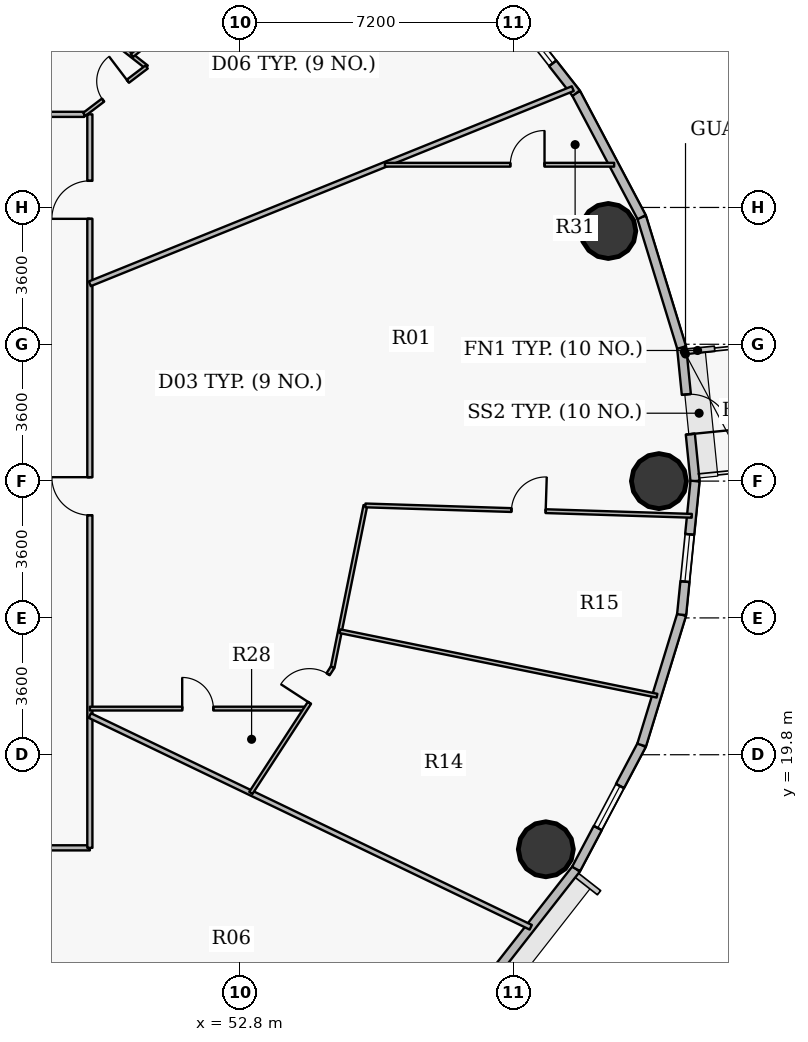
"""IFC4 building model, lengths in metres.
Left out: names, types, materials, properties, quantities, classifications, styles, units other than length and angle.
Written with IfcOpenShell. Run it as: python <this file> out.ifc"""

import sys

from ifc_helpers import new_model, si_unit, direction, frame, frame_2d, origin, origin_2d, place, context, subcontext, project, spatial, rectangle, hollow_circle, extrude, source, transform, mapped, element, fill, save


model = new_model("IFC4")
c1 = context("Model", 3, precision=1e-05, world=origin(), true_north=direction((0.0, 1.0)))
c2 = subcontext(c1, "Body", "Model", "MODEL_VIEW")
j1 = project(units=[si_unit("LENGTHUNIT", "METRE"), si_unit("PLANEANGLEUNIT", "RADIAN")], contexts=[c1])
p1 = place(None, origin())
s1 = spatial("IfcSite", under=j1, at=p1, CompositionType="ELEMENT")
p2 = place(p1, origin())
s2 = spatial("IfcBuilding", under=s1, at=p2, CompositionType="ELEMENT")
p3 = place(p2, frame((0.0, 0.0, 104.7)))
s3 = spatial("IfcBuildingStorey", under=s2, at=p3, CompositionType="ELEMENT", Elevation=104.7)
for number, where, z_axis, x_axis in (
    (1, (63.825, 27.0, 0.0), (0.0, 0.0, 1.0), (1.0, 0.0, 0.0)),
    (2, (62.493, 33.581, 0.0), (0.0, 0.0, 1.0), (1.0, 0.0, 0.0)),
    (3, (60.849, 17.312, 0.0), (0.0, 0.0, 1.0), (1.0, 0.0, 0.0)),
):
    element("IfcColumn", number, at=place(p3, frame(where, z_axis=z_axis, x_axis=x_axis)), inside=s3, PredefinedType="COLUMN", context=c2, shape_type="SweptSolid", body=[
        extrude(hollow_circle(Radius=0.725, WallThickness=0.042, at=origin_2d()), origin(), (0.0, 0.0, 1.0), 3.75),
    ])
p4 = place(p3, frame((64.422, 30.515, 0.0), z_axis=(0.0, 0.0, 1.0), x_axis=(0.099989468229, -0.994988495533, 0.0)))
e4 = element("IfcWall", 4, at=p4, inside=s3, PredefinedType="SOLIDWALL", context=c2, shape_type="SweptSolid", body=[
    extrude(rectangle(XDim=3.533, YDim=0.24, at=frame_2d((1.767, 0.0))), origin(), (0.0, 0.0, 1.0), 3.5),
])
p5 = place(p4, frame((1.241, 0.0, 0.0)))
e5 = element("IfcOpeningElement", 5, at=p5, cuts=e4, PredefinedType="OPENING", context=c2, shape_type="SweptSolid", body=[
    extrude(rectangle(XDim=1.05, YDim=2.15, at=origin_2d()), frame((0.525, 0.13, 1.075), z_axis=(0.0, -1.0, 0.0), x_axis=(1.0, 0.0, 0.0)), (0.0, 0.0, 1.0), 0.26),
])
p6 = place(p3, frame((63.37, 33.945, 0.0), z_axis=(0.0, 0.0, 1.0), x_axis=(0.293124431344, -0.956074300329, 0.0)))
e6 = element("IfcWall", 6, at=p6, inside=s3, PredefinedType="SOLIDWALL", context=c2, shape_type="SweptSolid", body=[
    extrude(rectangle(XDim=3.587, YDim=0.24, at=frame_2d((1.793, 0.0))), origin(), (0.0, 0.0, 1.0), 3.5),
])
p7 = place(p3, frame((61.645, 37.206, 0.0), z_axis=(0.0, 0.0, 1.0), x_axis=(0.467614004126, -0.883932770716, 0.0)))
e7 = element("IfcWall", 7, at=p7, inside=s3, PredefinedType="SOLIDWALL", context=c2, shape_type="SweptSolid", body=[
    extrude(rectangle(XDim=3.689, YDim=0.24, at=frame_2d((1.844, 0.0))), origin(), (0.0, 0.0, 1.0), 3.5),
])
p8 = place(p3, frame((59.289, 40.217, 0.0), z_axis=(0.0, 0.0, 1.0), x_axis=(0.616272103517, -0.787533297345, 0.0)))
e8 = element("IfcWall", 8, at=p8, inside=s3, PredefinedType="SOLIDWALL", context=c2, shape_type="SweptSolid", body=[
    extrude(rectangle(XDim=3.823, YDim=0.24, at=frame_2d((1.912, 0.0))), origin(), (0.0, 0.0, 1.0), 3.5),
])
p9 = place(p8, frame((0.824, 0.0, 0.9)))
e9 = element("IfcOpeningElement", 9, at=p9, cuts=e8, PredefinedType="OPENING", context=c2, shape_type="SweptSolid", body=[
    extrude(rectangle(XDim=2.0, YDim=1.75, at=origin_2d()), frame((1.0, 0.13, 0.875), z_axis=(0.0, -1.0, 0.0), x_axis=(1.0, 0.0, 0.0)), (0.0, 0.0, 1.0), 0.26),
])
p10 = place(p3, frame((61.645, 16.794, 0.0), z_axis=(0.0, 0.0, 1.0), x_axis=(-0.616272103517, -0.787533297345, 0.0)))
e10 = element("IfcWall", 10, at=p10, inside=s3, PredefinedType="SOLIDWALL", context=c2, shape_type="SweptSolid", body=[
    extrude(rectangle(XDim=3.823, YDim=0.24, at=frame_2d((1.912, 0.0))), origin(), (0.0, 0.0, 1.0), 3.5),
])
p11 = place(p3, frame((63.37, 20.055, 0.0), z_axis=(0.0, 0.0, 1.0), x_axis=(-0.467614004126, -0.883932770716, 0.0)))
e11 = element("IfcWall", 11, at=p11, inside=s3, PredefinedType="SOLIDWALL", context=c2, shape_type="SweptSolid", body=[
    extrude(rectangle(XDim=3.689, YDim=0.24, at=frame_2d((1.844, 0.0))), origin(), (0.0, 0.0, 1.0), 3.5),
])
p12 = place(p11, frame((1.219, 0.0, 0.9)))
e12 = element("IfcOpeningElement", 12, at=p12, cuts=e11, PredefinedType="OPENING", context=c2, shape_type="SweptSolid", body=[
    extrude(rectangle(XDim=1.25, YDim=1.65, at=origin_2d()), frame((0.625, 0.13, 0.825), z_axis=(0.0, -1.0, 0.0), x_axis=(1.0, 0.0, 0.0)), (0.0, 0.0, 1.0), 0.26),
])
p13 = place(p3, frame((64.422, 23.485, 0.0), z_axis=(0.0, 0.0, 1.0), x_axis=(-0.293124431344, -0.956074300329, 0.0)))
e13 = element("IfcWall", 13, at=p13, inside=s3, PredefinedType="SOLIDWALL", context=c2, shape_type="SweptSolid", body=[
    extrude(rectangle(XDim=3.587, YDim=0.24, at=frame_2d((1.793, 0.0))), origin(), (0.0, 0.0, 1.0), 3.5),
])
p14 = place(p3, frame((64.775, 27.0, 0.0), z_axis=(0.0, 0.0, 1.0), x_axis=(-0.099989468229, -0.994988495533, 0.0)))
e14 = element("IfcWall", 14, at=p14, inside=s3, PredefinedType="SOLIDWALL", context=c2, shape_type="SweptSolid", body=[
    extrude(rectangle(XDim=3.533, YDim=0.24, at=frame_2d((1.767, 0.0))), origin(), (0.0, 0.0, 1.0), 3.5),
])
p15 = place(p14, frame((1.408, 0.0, 0.9)))
e15 = element("IfcOpeningElement", 15, at=p15, cuts=e14, PredefinedType="OPENING", context=c2, shape_type="SweptSolid", body=[
    extrude(rectangle(XDim=1.25, YDim=1.65, at=origin_2d()), frame((0.625, 0.13, 0.825), z_axis=(0.0, -1.0, 0.0), x_axis=(1.0, 0.0, 0.0)), (0.0, 0.0, 1.0), 0.26),
])
p16 = place(p3, frame((34.795, 17.35, 0.0), z_axis=(0.0, 0.0, 1.0), x_axis=(1.0, 0.0, 0.0)))
e16 = element("IfcWall", 16, at=p16, inside=s3, PredefinedType="PARTITIONING", context=c2, shape_type="SweptSolid", body=[
    extrude(rectangle(XDim=14.055, YDim=0.135, at=frame_2d((7.028, 0.0))), origin(), (0.0, 0.0, 1.0), 2.935),
])
p17 = place(p16, frame((1.571, 0.0, 0.0)))
e17 = element("IfcOpeningElement", 17, at=p17, cuts=e16, PredefinedType="OPENING", context=c2, shape_type="SweptSolid", body=[
    extrude(rectangle(XDim=1.0, YDim=2.15, at=origin_2d()), frame((0.5, 0.078, 1.075), z_axis=(0.0, -1.0, 0.0), x_axis=(1.0, 0.0, 0.0)), (0.0, 0.0, 1.0), 0.155),
])
p18 = place(p16, frame((10.976, 0.0, 0.0)))
e18 = element("IfcOpeningElement", 18, at=p18, cuts=e16, PredefinedType="OPENING", context=c2, shape_type="SweptSolid", body=[
    extrude(rectangle(XDim=1.0, YDim=2.15, at=origin_2d()), frame((0.5, 0.078, 1.075), z_axis=(0.0, -1.0, 0.0), x_axis=(1.0, 0.0, 0.0)), (0.0, 0.0, 1.0), 0.155),
])
p19 = place(p3, frame((37.205, 36.65, 0.0), z_axis=(0.0, 0.0, 1.0), x_axis=(1.0, 0.0, 0.0)))
e19 = element("IfcWall", 19, at=p19, inside=s3, PredefinedType="PARTITIONING", context=c2, shape_type="SweptSolid", body=[
    extrude(rectangle(XDim=11.499, YDim=0.135, at=frame_2d((5.75, 0.0))), origin(), (0.0, 0.0, 1.0), 2.935),
])
p20 = place(p19, frame((3.988, 0.0, 0.0)))
e20 = element("IfcOpeningElement", 20, at=p20, cuts=e19, PredefinedType="OPENING", context=c2, shape_type="SweptSolid", body=[
    extrude(rectangle(XDim=1.0, YDim=2.15, at=origin_2d()), frame((0.5, 0.078, 1.075), z_axis=(0.0, -1.0, 0.0), x_axis=(1.0, 0.0, 0.0)), (0.0, 0.0, 1.0), 0.155),
])
p21 = place(p3, frame((43.42, 36.65, 0.0), z_axis=(0.0, 0.0, 1.0), x_axis=(0.609572126114, 0.792730611913, 0.0)))
e21 = element("IfcWall", 21, at=p21, inside=s3, PredefinedType="PARTITIONING", context=c2, shape_type="SweptSolid", body=[
    extrude(rectangle(XDim=12.086, YDim=0.135, at=frame_2d((6.043, 0.0))), origin(), (0.0, 0.0, 1.0), 2.935),
])
p22 = place(p3, frame((47.891, 39.816, 0.0), z_axis=(0.0, 0.0, 1.0), x_axis=(0.787339621997, -0.616519520887, 0.0)))
e22 = element("IfcWall", 22, at=p22, inside=s3, PredefinedType="PARTITIONING", context=c2, shape_type="SweptSolid", body=[
    extrude(rectangle(XDim=3.116, YDim=0.1, at=frame_2d((1.558, 0.0))), origin(), (0.0, 0.0, 1.0), 2.935),
])
p23 = place(p3, frame((48.704, 36.65, 0.0), z_axis=(0.0, 0.0, 1.0), x_axis=(0.796299280247, 0.604902848628, 0.0)))
e23 = element("IfcWall", 23, at=p23, inside=s3, PredefinedType="PARTITIONING", context=c2, shape_type="SweptSolid", body=[
    extrude(rectangle(XDim=2.059, YDim=0.1, at=frame_2d((1.029, 0.0))), origin(), (0.0, 0.0, 1.0), 2.935),
])
p24 = place(p23, frame((0.619, 0.0, 0.0)))
e24 = element("IfcOpeningElement", 24, at=p24, cuts=e23, PredefinedType="OPENING", context=c2, shape_type="SweptSolid", body=[
    extrude(rectangle(XDim=0.82, YDim=2.1, at=origin_2d()), frame((0.41, 0.06, 1.05), z_axis=(0.0, -1.0, 0.0), x_axis=(1.0, 0.0, 0.0)), (0.0, 0.0, 1.0), 0.12),
])
p25 = place(p3, frame((48.85, 17.35, 0.0), z_axis=(0.0, 0.0, 1.0), x_axis=(0.0, 1.0, 0.0)))
e25 = element("IfcWall", 25, at=p25, inside=s3, PredefinedType="PARTITIONING", context=c2, shape_type="SweptSolid", body=[
    extrude(rectangle(XDim=19.3, YDim=0.135, at=frame_2d((9.65, 0.0))), origin(), (0.0, 0.0, 1.0), 2.935),
])
p26 = place(p25, frame((16.551, 0.0, 0.0)))
e26 = element("IfcOpeningElement", 26, at=p26, cuts=e25, PredefinedType="OPENING", context=c2, shape_type="SweptSolid", body=[
    extrude(rectangle(XDim=1.0, YDim=2.15, at=origin_2d()), frame((0.5, 0.078, 1.075), z_axis=(0.0, -1.0, 0.0), x_axis=(1.0, 0.0, 0.0)), (0.0, 0.0, 1.0), 0.155),
])
p27 = place(p25, frame((8.753, 0.0, 0.0)))
e27 = element("IfcOpeningElement", 27, at=p27, cuts=e25, PredefinedType="OPENING", context=c2, shape_type="SweptSolid", body=[
    extrude(rectangle(XDim=1.0, YDim=2.15, at=origin_2d()), frame((0.5, 0.078, 1.075), z_axis=(0.0, -1.0, 0.0), x_axis=(1.0, 0.0, 0.0)), (0.0, 0.0, 1.0), 0.155),
])
p28 = place(p3, frame((48.85, 20.83, 0.0), z_axis=(0.0, 0.0, 1.0), x_axis=(0.901472427533, -0.432836530803, 0.0)))
e28 = element("IfcWall", 28, at=p28, inside=s3, PredefinedType="PARTITIONING", context=c2, shape_type="SweptSolid", body=[
    extrude(rectangle(XDim=12.869, YDim=0.135, at=frame_2d((6.434, 0.0))), origin(), (0.0, 0.0, 1.0), 2.935),
])
p29 = place(p3, frame((48.85, 21.014, 0.0), z_axis=(0.0, 0.0, 1.0), x_axis=(1.0, 0.0, 0.0)))
e29 = element("IfcWall", 29, at=p29, inside=s3, PredefinedType="PARTITIONING", context=c2, shape_type="SweptSolid", body=[
    extrude(rectangle(XDim=5.68, YDim=0.1, at=frame_2d((2.84, 0.0))), origin(), (0.0, 0.0, 1.0), 2.935),
])
p30 = place(p29, frame((2.43, 0.0, 0.0)))
e30 = element("IfcOpeningElement", 30, at=p30, cuts=e29, PredefinedType="OPENING", context=c2, shape_type="SweptSolid", body=[
    extrude(rectangle(XDim=0.82, YDim=2.1, at=origin_2d()), frame((0.41, 0.06, 1.05), z_axis=(0.0, -1.0, 0.0), x_axis=(1.0, 0.0, 0.0)), (0.0, 0.0, 1.0), 0.12),
])
p31 = place(p3, frame((48.85, 32.192, 0.0), z_axis=(0.0, 0.0, 1.0), x_axis=(0.927181163505, 0.374613253958, 0.0)))
e31 = element("IfcWall", 31, at=p31, inside=s3, PredefinedType="PARTITIONING", context=c2, shape_type="SweptSolid", body=[
    extrude(rectangle(XDim=13.706, YDim=0.135, at=frame_2d((6.853, 0.0))), origin(), (0.0, 0.0, 1.0), 2.935),
])
p32 = place(p3, frame((49.956, 38.198, 0.0), z_axis=(0.0, 0.0, 1.0), x_axis=(0.78000622602, 0.625771753413, 0.0)))
e32 = element("IfcWall", 32, at=p32, inside=s3, PredefinedType="PARTITIONING", context=c2, shape_type="SweptSolid", body=[
    extrude(rectangle(XDim=2.045, YDim=0.1, at=frame_2d((1.022, 0.0))), origin(), (0.0, 0.0, 1.0), 3.085),
])
p33 = place(p3, frame((53.087, 18.796, 0.0), z_axis=(0.0, 0.0, 1.0), x_axis=(0.545403476424, 0.838173638278, 0.0)))
e33 = element("IfcWall", 33, at=p33, inside=s3, PredefinedType="PARTITIONING", context=c2, shape_type="SweptSolid", body=[
    extrude(rectangle(XDim=3.948, YDim=0.1, at=frame_2d((1.974, 0.0))), origin(), (0.0, 0.0, 1.0), 2.935),
])
p34 = place(p33, frame((2.827, 0.0, 0.0)))
e34 = element("IfcOpeningElement", 34, at=p34, cuts=e33, PredefinedType="OPENING", context=c2, shape_type="SweptSolid", body=[
    extrude(rectangle(XDim=0.9, YDim=2.1, at=origin_2d()), frame((0.45, 0.06, 1.05), z_axis=(0.0, -1.0, 0.0), x_axis=(1.0, 0.0, 0.0)), (0.0, 0.0, 1.0), 0.12),
])
p35 = place(p3, frame((55.24, 22.105, 0.0), z_axis=(0.0, 0.0, 1.0), x_axis=(0.198113230311, 0.980179140757, 0.0)))
e35 = element("IfcWall", 35, at=p35, inside=s3, PredefinedType="PARTITIONING", context=c2, shape_type="SweptSolid", body=[
    extrude(rectangle(XDim=0.964, YDim=0.1, at=frame_2d((0.482, 0.0))), origin(), (0.0, 0.0, 1.0), 3.5),
])
p36 = place(p3, frame((55.433, 23.059, 0.0), z_axis=(0.0, 0.0, 1.0), x_axis=(0.198276597798, 0.980146106846, 0.0)))
e36 = element("IfcWall", 36, at=p36, inside=s3, PredefinedType="PARTITIONING", context=c2, shape_type="SweptSolid", body=[
    extrude(rectangle(XDim=3.368, YDim=0.1, at=frame_2d((1.684, 0.0))), origin(), (0.0, 0.0, 1.0), 3.5),
])
p37 = place(p3, frame((55.431, 23.05, 0.0), z_axis=(0.0, 0.0, 1.0), x_axis=(0.979953651871, -0.199225601228, 0.0)))
e37 = element("IfcWall", 37, at=p37, inside=s3, PredefinedType="PARTITIONING", context=c2, shape_type="SweptSolid", body=[
    extrude(rectangle(XDim=8.513, YDim=0.1, at=frame_2d((4.257, 0.0))), origin(), (0.0, 0.0, 1.0), 2.935),
])
p38 = place(p3, frame((56.101, 26.36, 0.0), z_axis=(0.0, 0.0, 1.0), x_axis=(0.999493466978, -0.031824667605, 0.0)))
e38 = element("IfcWall", 38, at=p38, inside=s3, PredefinedType="PARTITIONING", context=c2, shape_type="SweptSolid", body=[
    extrude(rectangle(XDim=8.592, YDim=0.1, at=frame_2d((4.296, 0.0))), origin(), (0.0, 0.0, 1.0), 2.935),
])
p39 = place(p38, frame((3.846, 0.0, 0.0)))
e39 = element("IfcOpeningElement", 39, at=p39, cuts=e38, PredefinedType="OPENING", context=c2, shape_type="SweptSolid", body=[
    extrude(rectangle(XDim=0.9, YDim=2.1, at=origin_2d()), frame((0.45, 0.06, 1.05), z_axis=(0.0, -1.0, 0.0), x_axis=(1.0, 0.0, 0.0)), (0.0, 0.0, 1.0), 0.12),
])
p40 = place(p3, frame((56.615, 35.324, 0.0), z_axis=(0.0, 0.0, 1.0), x_axis=(1.0, 0.0, 0.0)))
e40 = element("IfcWall", 40, at=p40, inside=s3, PredefinedType="PARTITIONING", context=c2, shape_type="SweptSolid", body=[
    extrude(rectangle(XDim=6.031, YDim=0.1, at=frame_2d((3.016, 0.0))), origin(), (0.0, 0.0, 1.0), 2.935),
])
p41 = place(p40, frame((3.3, 0.0, 0.0)))
e41 = element("IfcOpeningElement", 41, at=p41, cuts=e40, PredefinedType="OPENING", context=c2, shape_type="SweptSolid", body=[
    extrude(rectangle(XDim=0.9, YDim=2.1, at=origin_2d()), frame((0.45, 0.06, 1.05), z_axis=(0.0, -1.0, 0.0), x_axis=(1.0, 0.0, 0.0)), (0.0, 0.0, 1.0), 0.12),
])
m1 = source(origin(), c2, "Body", "SweptSolid", [
    extrude(rectangle(XDim=1.05, YDim=2.15, at=origin_2d()), frame((0.525, 0.025, 1.075), z_axis=(0.0, -1.0, 0.0), x_axis=(1.0, 0.0, 0.0)), (0.0, 0.0, 1.0), 0.05),
])
p42 = place(p5, origin())
e42 = element("IfcDoor", 42, at=p42, inside=s3, OperationType="SINGLE_SWING_RIGHT", PredefinedType="DOOR", context=c2, shape_type="MappedRepresentation", body=[
    mapped(m1, transform((0.0, 0.0, 0.0), x_axis=(1.0, 0.0, 0.0), y_axis=(0.0, 1.0, 0.0), z_axis=(0.0, 0.0, 1.0), scale=1.0)),
])
fill(e5, e42)
m2 = source(origin(), c2, "Body", "SweptSolid", [
    extrude(rectangle(XDim=2.0, YDim=1.75, at=origin_2d()), frame((1.0, 0.03, 0.875), z_axis=(0.0, -1.0, 0.0), x_axis=(1.0, 0.0, 0.0)), (0.0, 0.0, 1.0), 0.06),
])
p43 = place(p9, origin())
e43 = element("IfcWindow", 43, at=p43, inside=s3, PartitioningType="DOUBLE_PANEL_VERTICAL", PredefinedType="WINDOW", context=c2, shape_type="MappedRepresentation", body=[
    mapped(m2, transform((0.0, 0.0, 0.0), x_axis=(1.0, 0.0, 0.0), y_axis=(0.0, 1.0, 0.0), z_axis=(0.0, 0.0, 1.0), scale=1.0)),
])
fill(e9, e43)
m3 = source(origin(), c2, "Body", "SweptSolid", [
    extrude(rectangle(XDim=1.25, YDim=1.65, at=origin_2d()), frame((0.625, 0.03, 0.825), z_axis=(0.0, -1.0, 0.0), x_axis=(1.0, 0.0, 0.0)), (0.0, 0.0, 1.0), 0.06),
])
p44 = place(p15, origin())
e44 = element("IfcWindow", 44, at=p44, inside=s3, PartitioningType="SINGLE_PANEL", PredefinedType="WINDOW", context=c2, shape_type="MappedRepresentation", body=[
    mapped(m3, transform((0.0, 0.0, 0.0), x_axis=(1.0, 0.0, 0.0), y_axis=(0.0, 1.0, 0.0), z_axis=(0.0, 0.0, 1.0), scale=1.0)),
])
fill(e15, e44)
p45 = place(p12, origin())
e45 = element("IfcWindow", 45, at=p45, inside=s3, PartitioningType="SINGLE_PANEL", PredefinedType="WINDOW", context=c2, shape_type="MappedRepresentation", body=[
    mapped(m3, transform((0.0, 0.0, 0.0), x_axis=(1.0, 0.0, 0.0), y_axis=(0.0, 1.0, 0.0), z_axis=(0.0, 0.0, 1.0), scale=1.0)),
])
fill(e12, e45)
m4 = source(origin(), c2, "Body", "SweptSolid", [
    extrude(rectangle(XDim=1.0, YDim=2.15, at=origin_2d()), frame((0.5, 0.025, 1.075), z_axis=(0.0, -1.0, 0.0), x_axis=(1.0, 0.0, 0.0)), (0.0, 0.0, 1.0), 0.05),
])
p46 = place(p26, origin())
e46 = element("IfcDoor", 46, at=p46, inside=s3, OperationType="SINGLE_SWING_LEFT", PredefinedType="DOOR", context=c2, shape_type="MappedRepresentation", body=[
    mapped(m4, transform((0.0, 0.0, 0.0), x_axis=(1.0, 0.0, 0.0), y_axis=(0.0, 1.0, 0.0), z_axis=(0.0, 0.0, 1.0), scale=1.0)),
])
fill(e26, e46)
m5 = source(origin(), c2, "Body", "SweptSolid", [
    extrude(rectangle(XDim=0.82, YDim=2.1, at=origin_2d()), frame((0.41, 0.025, 1.05), z_axis=(0.0, -1.0, 0.0), x_axis=(1.0, 0.0, 0.0)), (0.0, 0.0, 1.0), 0.05),
])
p47 = place(p24, origin())
e47 = element("IfcDoor", 47, at=p47, inside=s3, OperationType="SINGLE_SWING_RIGHT", PredefinedType="DOOR", context=c2, shape_type="MappedRepresentation", body=[
    mapped(m5, transform((0.0, 0.0, 0.0), x_axis=(1.0, 0.0, 0.0), y_axis=(0.0, 1.0, 0.0), z_axis=(0.0, 0.0, 1.0), scale=1.0)),
])
fill(e24, e47)
p48 = place(p27, origin())
e48 = element("IfcDoor", 48, at=p48, inside=s3, OperationType="SINGLE_SWING_RIGHT", PredefinedType="DOOR", context=c2, shape_type="MappedRepresentation", body=[
    mapped(m4, transform((0.0, 0.0, 0.0), x_axis=(1.0, 0.0, 0.0), y_axis=(0.0, 1.0, 0.0), z_axis=(0.0, 0.0, 1.0), scale=1.0)),
])
fill(e27, e48)
m6 = source(origin(), c2, "Body", "SweptSolid", [
    extrude(rectangle(XDim=0.9, YDim=2.1, at=origin_2d()), frame((0.45, 0.025, 1.05), z_axis=(0.0, -1.0, 0.0), x_axis=(1.0, 0.0, 0.0)), (0.0, 0.0, 1.0), 0.05),
])
p49 = place(p34, origin())
e49 = element("IfcDoor", 49, at=p49, inside=s3, OperationType="SINGLE_SWING_LEFT", PredefinedType="DOOR", context=c2, shape_type="MappedRepresentation", body=[
    mapped(m6, transform((0.0, 0.0, 0.0), x_axis=(1.0, 0.0, 0.0), y_axis=(0.0, 1.0, 0.0), z_axis=(0.0, 0.0, 1.0), scale=1.0)),
])
fill(e34, e49)
p50 = place(p39, origin())
e50 = element("IfcDoor", 50, at=p50, inside=s3, OperationType="SINGLE_SWING_RIGHT", PredefinedType="DOOR", context=c2, shape_type="MappedRepresentation", body=[
    mapped(m6, transform((0.0, 0.0, 0.0), x_axis=(1.0, 0.0, 0.0), y_axis=(0.0, 1.0, 0.0), z_axis=(0.0, 0.0, 1.0), scale=1.0)),
])
fill(e39, e50)
p51 = place(p30, origin())
e51 = element("IfcDoor", 51, at=p51, inside=s3, OperationType="SINGLE_SWING_LEFT", PredefinedType="DOOR", context=c2, shape_type="MappedRepresentation", body=[
    mapped(m5, transform((0.0, 0.0, 0.0), x_axis=(1.0, 0.0, 0.0), y_axis=(0.0, 1.0, 0.0), z_axis=(0.0, 0.0, 1.0), scale=1.0)),
])
fill(e30, e51)
p52 = place(p41, origin())
e52 = element("IfcDoor", 52, at=p52, inside=s3, OperationType="SINGLE_SWING_RIGHT", PredefinedType="DOOR", context=c2, shape_type="MappedRepresentation", body=[
    mapped(m6, transform((0.0, 0.0, 0.0), x_axis=(1.0, 0.0, 0.0), y_axis=(0.0, 1.0, 0.0), z_axis=(0.0, 0.0, 1.0), scale=1.0)),
])
fill(e41, e52)
save(model, sys.argv[1])
